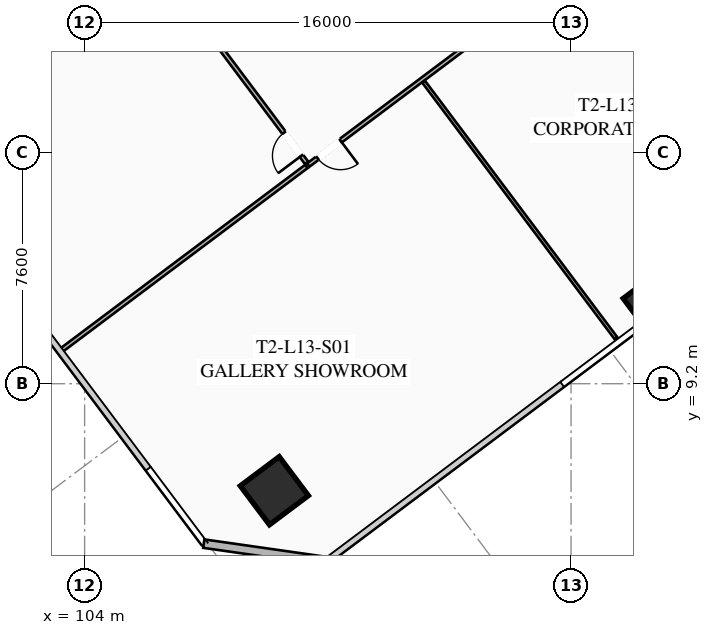
"""IFC4 building model, lengths in metres.
Left out: names, types, materials, properties, quantities, classifications, styles, units other than length and angle.
Written with IfcOpenShell. Run it as: python <this file> out.ifc"""

import sys

from ifc_helpers import new_model, si_unit, direction, frame, frame_2d, origin, origin_2d, place, context, subcontext, project, spatial, rectangle, hollow_rectangle, extrude, element, fill, save


model = new_model("IFC4")
c1 = context("Model", 3, precision=1e-05, world=origin(), true_north=direction((0.0, 1.0)))
c2 = subcontext(c1, "Body", "Model", "MODEL_VIEW")
j1 = project(units=[si_unit("LENGTHUNIT", "METRE"), si_unit("PLANEANGLEUNIT", "RADIAN")], contexts=[c1])
p1 = place(None, origin())
s1 = spatial("IfcSite", under=j1, at=p1, CompositionType="ELEMENT")
p2 = place(p1, origin())
s2 = spatial("IfcBuilding", under=s1, at=p2, CompositionType="ELEMENT")
p3 = place(p2, frame((0.0, 0.0, 53.0)))
s3 = spatial("IfcBuildingStorey", under=s2, at=p3, CompositionType="ELEMENT", Elevation=53.0)
p4 = place(p3, frame((110.24, 5.68, 0.0), z_axis=(0.0, 0.0, 1.0), x_axis=(0.799999996291, 0.600000004945, 0.0)))
e1 = element("IfcColumn", 1, at=p4, inside=s3, PredefinedType="COLUMN", context=c2, shape_type="SweptSolid", body=[
    extrude(hollow_rectangle(XDim=1.6, YDim=1.6, WallThickness=0.06, at=origin_2d()), origin(), (0.0, 0.0, 1.0), 3.35),
])
p5 = place(p3, frame((122.31, 11.92, 0.0), z_axis=(0.0, 0.0, 1.0), x_axis=(0.799999996291, 0.600000004945, 0.0)))
e2 = element("IfcColumn", 2, at=p5, inside=s3, PredefinedType="COLUMN", context=c2, shape_type="SweptSolid", body=[
    extrude(hollow_rectangle(XDim=0.85, YDim=0.85, WallThickness=0.035, at=origin_2d()), origin(), (0.0, 0.0, 1.0), 3.35),
])
p6 = place(p3, frame((111.98, 3.36, 0.0), z_axis=(0.0, 0.0, 1.0), x_axis=(-0.989955445613, 0.14137968631, 0.0)))
e3 = element("IfcWall", 3, at=p6, inside=s3, PredefinedType="SOLIDWALL", context=c2, shape_type="SweptSolid", body=[
    extrude(rectangle(XDim=4.101, YDim=0.28, at=frame_2d((2.051, 0.0))), origin(), (0.0, 0.0, 1.0), 3.35),
])
p7 = place(p3, frame((135.46, 34.47, 0.0), z_axis=(0.0, 0.0, 1.0), x_axis=(-0.800001944698, -0.59999740706, 0.0)))
e4 = element("IfcWall", 4, at=p7, inside=s3, PredefinedType="PARTITIONING", context=c2, shape_type="SweptSolid", body=[
    extrude(rectangle(XDim=30.13, YDim=0.135, at=frame_2d((15.065, 0.0))), origin(), (0.0, 0.0, 1.0), 2.703),
])
p8 = place(p7, frame((28.8, 0.0, 0.0)))
e5 = element("IfcOpeningElement", 5, at=p8, cuts=e4, PredefinedType="OPENING", context=c2, shape_type="SweptSolid", body=[
    extrude(rectangle(XDim=0.95, YDim=2.05, at=frame_2d((0.475, 1.025))), frame((0.0, 0.077, 0.0), z_axis=(0.0, -1.0, 0.0), x_axis=(1.0, 0.0, 0.0)), (0.0, 0.0, 1.0), 0.155),
])
p9 = place(p7, frame((17.921, 0.0, 0.0)))
e6 = element("IfcOpeningElement", 6, at=p9, cuts=e4, PredefinedType="OPENING", context=c2, shape_type="SweptSolid", body=[
    extrude(rectangle(XDim=0.95, YDim=2.05, at=frame_2d((0.475, 1.025))), frame((0.0, 0.077, 0.0), z_axis=(0.0, -1.0, 0.0), x_axis=(1.0, 0.0, 0.0)), (0.0, 0.0, 1.0), 0.155),
])
p10 = place(p7, frame((14.129, 0.0, 0.0)))
e7 = element("IfcOpeningElement", 7, at=p10, cuts=e4, PredefinedType="OPENING", context=c2, shape_type="SweptSolid", body=[
    extrude(rectangle(XDim=0.95, YDim=2.05, at=frame_2d((0.475, 1.025))), frame((0.0, 0.077, 0.0), z_axis=(0.0, -1.0, 0.0), x_axis=(1.0, 0.0, 0.0)), (0.0, 0.0, 1.0), 0.155),
])
p11 = place(p7, frame((0.38, 0.0, 0.0)))
e8 = element("IfcOpeningElement", 8, at=p11, cuts=e4, PredefinedType="OPENING", context=c2, shape_type="SweptSolid", body=[
    extrude(rectangle(XDim=0.95, YDim=2.05, at=frame_2d((0.475, 1.025))), frame((0.0, 0.077, 0.0), z_axis=(0.0, -1.0, 0.0), x_axis=(1.0, 0.0, 0.0)), (0.0, 0.0, 1.0), 0.155),
])
p12 = place(p3, frame((121.478, 10.696, 0.0), z_axis=(0.0, 0.0, 1.0), x_axis=(-0.600007405188, 0.799994446056, 0.0)))
e9 = element("IfcWall", 9, at=p12, inside=s3, PredefinedType="PARTITIONING", context=c2, shape_type="SweptSolid", body=[
    extrude(rectangle(XDim=10.55, YDim=0.11, at=frame_2d((5.275, 0.0))), origin(), (0.0, 0.0, 1.0), 2.703),
])
p13 = place(p3, frame((111.308, 16.456, 0.0), z_axis=(0.0, 0.0, 1.0), x_axis=(-0.600003610192, 0.799997292343, 0.0)))
e10 = element("IfcWall", 10, at=p13, inside=s3, PredefinedType="PARTITIONING", context=c2, shape_type="SweptSolid", body=[
    extrude(rectangle(XDim=21.64, YDim=0.135, at=frame_2d((10.82, 0.0))), origin(), (0.0, 0.0, 1.0), 2.703),
])
p14 = place(p13, frame((0.3, 0.0, 0.0)))
e11 = element("IfcOpeningElement", 11, at=p14, cuts=e10, PredefinedType="OPENING", context=c2, shape_type="SweptSolid", body=[
    extrude(rectangle(XDim=0.95, YDim=2.05, at=frame_2d((0.475, 1.025))), frame((0.0, 0.077, 0.0), z_axis=(0.0, -1.0, 0.0), x_axis=(1.0, 0.0, 0.0)), (0.0, 0.0, 1.0), 0.155),
])
p15 = place(p3, frame((103.196, 10.272, 0.0), z_axis=(0.0, 0.0, 1.0), x_axis=(0.799997105034, 0.600003859935, 0.0)))
e12 = element("IfcWall", 12, at=p15, inside=s3, PredefinedType="PARTITIONING", context=c2, shape_type="SweptSolid", body=[
    extrude(rectangle(XDim=10.12, YDim=0.135, at=frame_2d((5.06, 0.0))), origin(), (0.0, 0.0, 1.0), 2.703),
])
p16 = place(p8, origin())
e13 = element("IfcDoor", 13, at=p16, inside=s3, OperationType="SINGLE_SWING_LEFT", PredefinedType="DOOR", context=c2, shape_type="SweptSolid", body=[
    extrude(rectangle(XDim=0.95, YDim=2.05, at=frame_2d((0.475, 1.025))), frame((0.0, 0.025, 0.0), z_axis=(0.0, -1.0, 0.0), x_axis=(1.0, 0.0, 0.0)), (0.0, 0.0, 1.0), 0.05),
])
fill(e5, e13)
p17 = place(p14, origin())
e14 = element("IfcDoor", 14, at=p17, inside=s3, OperationType="SINGLE_SWING_LEFT", PredefinedType="DOOR", context=c2, shape_type="SweptSolid", body=[
    extrude(rectangle(XDim=0.95, YDim=2.05, at=frame_2d((0.475, 1.025))), frame((0.0, 0.025, 0.0), z_axis=(0.0, -1.0, 0.0), x_axis=(1.0, 0.0, 0.0)), (0.0, 0.0, 1.0), 0.05),
])
fill(e11, e14)
save(model, sys.argv[1])
